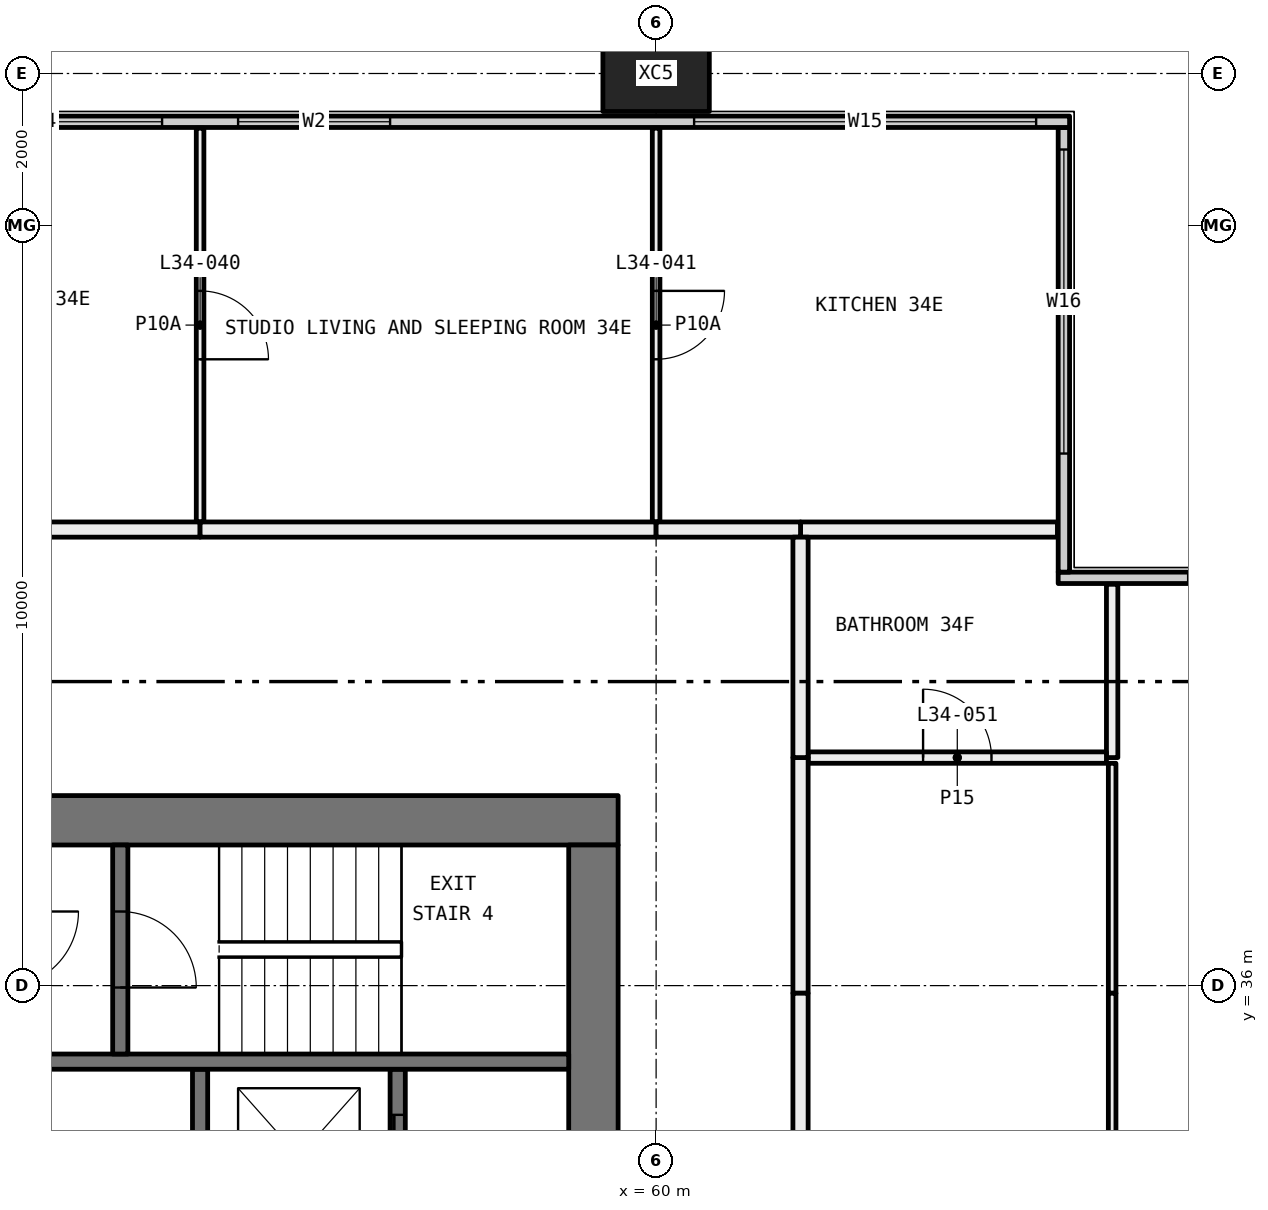
"""IFC4 building model, lengths in metres.
Left out: names, types, materials, properties, quantities, classifications, styles, units other than length and angle.
Written with IfcOpenShell. Run it as: python <this file> out.ifc"""

import sys

from ifc_helpers import new_model, si_unit, direction, frame, frame_2d, origin, origin_2d, place, context, subcontext, project, spatial, rectangle, hollow_rectangle, extrude, element, fill, save


model = new_model("IFC4")
c1 = context("Model", 3, precision=1e-05, world=origin(), true_north=direction((0.0, 1.0)))
c2 = subcontext(c1, "Body", "Model", "MODEL_VIEW")
j1 = project(units=[si_unit("LENGTHUNIT", "METRE"), si_unit("PLANEANGLEUNIT", "RADIAN")], contexts=[c1])
p1 = place(None, origin())
s1 = spatial("IfcSite", under=j1, at=p1, CompositionType="ELEMENT")
p2 = place(p1, origin())
s2 = spatial("IfcBuilding", under=s1, at=p2, CompositionType="ELEMENT")
p3 = place(p2, frame((0.0, 0.0, 131.1)))
s3 = spatial("IfcBuildingStorey", under=s2, at=p3, CompositionType="ELEMENT", Elevation=131.1)
p4 = place(p3, frame((60.0, 48.0, -0.4), z_axis=(0.0, 0.0, 1.0), x_axis=(1.0, 0.0, 0.0)))
e1 = element("IfcColumn", 1, at=p4, inside=s3, PredefinedType="COLUMN", context=c2, shape_type="SweptSolid", body=[
    extrude(hollow_rectangle(XDim=1.4, YDim=1.0, WallThickness=0.055, at=origin_2d()), origin(), (0.0, 0.0, 1.0), 3.45),
])
p5 = place(p3, frame((65.29, 41.365, 0.0), z_axis=(0.0, 0.0, 1.0), x_axis=(1.0, 0.0, 0.0)))
e2 = element("IfcWall", 2, at=p5, inside=s3, PredefinedType="ELEMENTEDWALL", context=c2, shape_type="SweptSolid", body=[
    extrude(rectangle(XDim=6.15, YDim=0.15, at=frame_2d((3.075, 0.0))), origin(), (0.0, 0.0, 1.0), 3.05),
])
p6 = place(p5, frame((1.71, 0.0, 0.45)))
e3 = element("IfcOpeningElement", 3, at=p6, cuts=e2, PredefinedType="OPENING", context=c2, shape_type="SweptSolid", body=[
    extrude(rectangle(XDim=4.0, YDim=2.55, at=frame_2d((2.0, 1.275))), frame((0.0, 0.085, 0.0), z_axis=(0.0, -1.0, 0.0), x_axis=(1.0, 0.0, 0.0)), (0.0, 0.0, 1.0), 0.17),
])
p7 = place(p3, frame((65.365, 41.44, 0.0), z_axis=(0.0, 0.0, 1.0), x_axis=(0.0, 1.0, 0.0)))
e4 = element("IfcWall", 4, at=p7, inside=s3, PredefinedType="ELEMENTEDWALL", context=c2, shape_type="SweptSolid", body=[
    extrude(rectangle(XDim=5.85, YDim=0.15, at=frame_2d((2.925, 0.0))), origin(), (0.0, 0.0, 1.0), 3.05),
])
p8 = place(p7, frame((1.56, 0.0, 0.45)))
e5 = element("IfcOpeningElement", 5, at=p8, cuts=e4, PredefinedType="OPENING", context=c2, shape_type="SweptSolid", body=[
    extrude(rectangle(XDim=4.0, YDim=2.55, at=frame_2d((2.0, 1.275))), frame((0.0, 0.085, 0.0), z_axis=(0.0, -1.0, 0.0), x_axis=(1.0, 0.0, 0.0)), (0.0, 0.0, 1.0), 0.17),
])
p9 = place(p3, frame((6.56, 47.365, 0.0), z_axis=(0.0, 0.0, 1.0), x_axis=(1.0, 0.0, 0.0)))
e6 = element("IfcWall", 6, at=p9, inside=s3, PredefinedType="ELEMENTEDWALL", context=c2, shape_type="SweptSolid", body=[
    extrude(rectangle(XDim=58.88, YDim=0.15, at=frame_2d((29.44, 0.0))), origin(), (0.0, 0.0, 1.0), 3.05),
])
p10 = place(p9, frame((0.44, 0.0, 0.45)))
e7 = element("IfcOpeningElement", 7, at=p10, cuts=e6, PredefinedType="OPENING", context=c2, shape_type="SweptSolid", body=[
    extrude(rectangle(XDim=4.5, YDim=2.55, at=frame_2d((2.25, 1.275))), frame((0.0, 0.085, 0.0), z_axis=(0.0, -1.0, 0.0), x_axis=(1.0, 0.0, 0.0)), (0.0, 0.0, 1.0), 0.17),
])
p11 = place(p9, frame((7.69, 0.0, 0.45)))
e8 = element("IfcOpeningElement", 8, at=p11, cuts=e6, PredefinedType="OPENING", context=c2, shape_type="SweptSolid", body=[
    extrude(rectangle(XDim=3.25, YDim=2.55, at=frame_2d((1.625, 1.275))), frame((0.0, 0.085, 0.0), z_axis=(0.0, -1.0, 0.0), x_axis=(1.0, 0.0, 0.0)), (0.0, 0.0, 1.0), 0.17),
])
p12 = place(p9, frame((11.94, 0.0, 0.45)))
e9 = element("IfcOpeningElement", 9, at=p12, cuts=e6, PredefinedType="OPENING", context=c2, shape_type="SweptSolid", body=[
    extrude(rectangle(XDim=3.25, YDim=2.55, at=frame_2d((1.625, 1.275))), frame((0.0, 0.085, 0.0), z_axis=(0.0, -1.0, 0.0), x_axis=(1.0, 0.0, 0.0)), (0.0, 0.0, 1.0), 0.17),
])
p13 = place(p9, frame((19.69, 0.0, 0.45)))
e10 = element("IfcOpeningElement", 10, at=p13, cuts=e6, PredefinedType="OPENING", context=c2, shape_type="SweptSolid", body=[
    extrude(rectangle(XDim=3.25, YDim=2.55, at=frame_2d((1.625, 1.275))), frame((0.0, 0.085, 0.0), z_axis=(0.0, -1.0, 0.0), x_axis=(1.0, 0.0, 0.0)), (0.0, 0.0, 1.0), 0.17),
])
p14 = place(p9, frame((23.94, 0.0, 0.45)))
e11 = element("IfcOpeningElement", 11, at=p14, cuts=e6, PredefinedType="OPENING", context=c2, shape_type="SweptSolid", body=[
    extrude(rectangle(XDim=2.0, YDim=2.55, at=frame_2d((1.0, 1.275))), frame((0.0, 0.085, 0.0), z_axis=(0.0, -1.0, 0.0), x_axis=(1.0, 0.0, 0.0)), (0.0, 0.0, 1.0), 0.17),
])
p15 = place(p9, frame((31.69, 0.0, 0.45)))
e12 = element("IfcOpeningElement", 12, at=p15, cuts=e6, PredefinedType="OPENING", context=c2, shape_type="SweptSolid", body=[
    extrude(rectangle(XDim=3.25, YDim=2.55, at=frame_2d((1.625, 1.275))), frame((0.0, 0.085, 0.0), z_axis=(0.0, -1.0, 0.0), x_axis=(1.0, 0.0, 0.0)), (0.0, 0.0, 1.0), 0.17),
])
p16 = place(p9, frame((35.94, 0.0, 0.45)))
e13 = element("IfcOpeningElement", 13, at=p16, cuts=e6, PredefinedType="OPENING", context=c2, shape_type="SweptSolid", body=[
    extrude(rectangle(XDim=3.25, YDim=2.55, at=frame_2d((1.625, 1.275))), frame((0.0, 0.085, 0.0), z_axis=(0.0, -1.0, 0.0), x_axis=(1.0, 0.0, 0.0)), (0.0, 0.0, 1.0), 0.17),
])
p17 = place(p9, frame((43.69, 0.0, 0.45)))
e14 = element("IfcOpeningElement", 14, at=p17, cuts=e6, PredefinedType="OPENING", context=c2, shape_type="SweptSolid", body=[
    extrude(rectangle(XDim=3.25, YDim=2.55, at=frame_2d((1.625, 1.275))), frame((0.0, 0.085, 0.0), z_axis=(0.0, -1.0, 0.0), x_axis=(1.0, 0.0, 0.0)), (0.0, 0.0, 1.0), 0.17),
])
p18 = place(p9, frame((47.94, 0.0, 0.45)))
e15 = element("IfcOpeningElement", 15, at=p18, cuts=e6, PredefinedType="OPENING", context=c2, shape_type="SweptSolid", body=[
    extrude(rectangle(XDim=2.0, YDim=2.55, at=frame_2d((1.0, 1.275))), frame((0.0, 0.085, 0.0), z_axis=(0.0, -1.0, 0.0), x_axis=(1.0, 0.0, 0.0)), (0.0, 0.0, 1.0), 0.17),
])
p19 = place(p9, frame((53.94, 0.0, 0.45)))
e16 = element("IfcOpeningElement", 16, at=p19, cuts=e6, PredefinedType="OPENING", context=c2, shape_type="SweptSolid", body=[
    extrude(rectangle(XDim=4.5, YDim=2.55, at=frame_2d((2.25, 1.275))), frame((0.0, 0.085, 0.0), z_axis=(0.0, -1.0, 0.0), x_axis=(1.0, 0.0, 0.0)), (0.0, 0.0, 1.0), 0.17),
])
p20 = place(p3, frame((54.0, 42.1, 0.0), z_axis=(0.0, 0.0, 1.0), x_axis=(0.0, 1.0, 0.0)))
e17 = element("IfcWall", 17, at=p20, inside=s3, PredefinedType="PARTITIONING", context=c2, shape_type="SweptSolid", body=[
    extrude(rectangle(XDim=5.18, YDim=0.1, at=frame_2d((2.59, 0.0))), origin(), (0.0, 0.0, 1.0), 3.05),
])
p21 = place(p20, frame((2.14, 0.0, 0.0)))
e18 = element("IfcOpeningElement", 18, at=p21, cuts=e17, PredefinedType="OPENING", context=c2, shape_type="SweptSolid", body=[
    extrude(rectangle(XDim=0.9, YDim=2.1, at=frame_2d((0.45, 1.05))), frame((0.0, 0.06, 0.0), z_axis=(0.0, -1.0, 0.0), x_axis=(1.0, 0.0, 0.0)), (0.0, 0.0, 1.0), 0.12),
])
p22 = place(p3, frame((48.0, 42.0, 0.0), z_axis=(0.0, 0.0, 1.0), x_axis=(1.0, 0.0, 0.0)))
e19 = element("IfcWall", 19, at=p22, inside=s3, PredefinedType="PARTITIONING", context=c2, shape_type="SweptSolid", body=[
    extrude(rectangle(XDim=6.0, YDim=0.2, at=frame_2d((3.0, 0.0))), origin(), (0.0, 0.0, 1.0), 3.05),
])
p23 = place(p22, frame((2.5, 0.0, 0.0)))
e20 = element("IfcOpeningElement", 20, at=p23, cuts=e19, PredefinedType="OPENING", context=c2, shape_type="SweptSolid", body=[
    extrude(rectangle(XDim=1.0, YDim=2.1, at=frame_2d((0.5, 1.05))), frame((0.0, 0.11, 0.0), z_axis=(0.0, -1.0, 0.0), x_axis=(1.0, 0.0, 0.0)), (0.0, 0.0, 1.0), 0.22),
])
p24 = place(p3, frame((60.0, 42.1, 0.0), z_axis=(0.0, 0.0, 1.0), x_axis=(0.0, 1.0, 0.0)))
e21 = element("IfcWall", 21, at=p24, inside=s3, PredefinedType="PARTITIONING", context=c2, shape_type="SweptSolid", body=[
    extrude(rectangle(XDim=5.18, YDim=0.1, at=frame_2d((2.59, 0.0))), origin(), (0.0, 0.0, 1.0), 3.05),
])
p25 = place(p24, frame((2.14, 0.0, 0.0)))
e22 = element("IfcOpeningElement", 22, at=p25, cuts=e21, PredefinedType="OPENING", context=c2, shape_type="SweptSolid", body=[
    extrude(rectangle(XDim=0.9, YDim=2.1, at=frame_2d((0.45, 1.05))), frame((0.0, 0.06, 0.0), z_axis=(0.0, -1.0, 0.0), x_axis=(1.0, 0.0, 0.0)), (0.0, 0.0, 1.0), 0.12),
])
p26 = place(p3, frame((54.0, 42.0, 0.0), z_axis=(0.0, 0.0, 1.0), x_axis=(1.0, 0.0, 0.0)))
e23 = element("IfcWall", 23, at=p26, inside=s3, PredefinedType="PARTITIONING", context=c2, shape_type="SweptSolid", body=[
    extrude(rectangle(XDim=6.0, YDim=0.2, at=frame_2d((3.0, 0.0))), origin(), (0.0, 0.0, 1.0), 3.05),
])
p27 = place(p3, frame((61.9, 42.0, 0.0), z_axis=(0.0, 0.0, 1.0), x_axis=(1.0, 0.0, 0.0)))
e24 = element("IfcWall", 24, at=p27, inside=s3, PredefinedType="PARTITIONING", context=c2, shape_type="SweptSolid", body=[
    extrude(rectangle(XDim=3.38, YDim=0.2, at=frame_2d((1.69, 0.0))), origin(), (0.0, 0.0, 1.0), 3.05),
])
p28 = place(p3, frame((60.0, 42.0, 0.0), z_axis=(0.0, 0.0, 1.0), x_axis=(1.0, 0.0, 0.0)))
e25 = element("IfcWall", 25, at=p28, inside=s3, PredefinedType="PARTITIONING", context=c2, shape_type="SweptSolid", body=[
    extrude(rectangle(XDim=1.9, YDim=0.2, at=frame_2d((0.95, 0.0))), origin(), (0.0, 0.0, 1.0), 3.05),
])
p29 = place(p3, frame((66.0, 38.925, 0.0), z_axis=(0.0, 0.0, 1.0), x_axis=(0.0, -1.0, 0.0)))
e26 = element("IfcWall", 26, at=p29, inside=s3, PredefinedType="PARTITIONING", context=c2, shape_type="SweptSolid", body=[
    extrude(rectangle(XDim=3.025, YDim=0.1, at=frame_2d((1.513, 0.0))), origin(), (0.0, 0.0, 1.0), 2.45),
])
p30 = place(p3, frame((66.0, 35.9, 0.0), z_axis=(0.0, 0.0, 1.0), x_axis=(0.0, -1.0, 0.0)))
e27 = element("IfcWall", 27, at=p30, inside=s3, PredefinedType="PARTITIONING", context=c2, shape_type="SweptSolid", body=[
    extrude(rectangle(XDim=5.85, YDim=0.1, at=frame_2d((2.925, 0.0))), origin(), (0.0, 0.0, 1.0), 3.05),
])
p31 = place(p3, frame((66.0, 41.28, 0.0), z_axis=(0.0, 0.0, 1.0), x_axis=(0.0, -1.0, 0.0)))
e28 = element("IfcWall", 28, at=p31, inside=s3, PredefinedType="PARTITIONING", context=c2, shape_type="SweptSolid", body=[
    extrude(rectangle(XDim=2.28, YDim=0.15, at=frame_2d((1.14, 0.0))), origin(), (0.0, 0.0, 1.0), 3.05),
])
p32 = place(p3, frame((65.925, 39.0, 0.0), z_axis=(0.0, 0.0, 1.0), x_axis=(-1.0, 0.0, 0.0)))
e29 = element("IfcWall", 29, at=p32, inside=s3, PredefinedType="PARTITIONING", context=c2, shape_type="SweptSolid", body=[
    extrude(rectangle(XDim=3.925, YDim=0.15, at=frame_2d((1.962, 0.0))), origin(), (0.0, 0.0, 1.0), 3.05),
])
p33 = place(p32, frame((1.512, 0.0, 0.0)))
e30 = element("IfcOpeningElement", 30, at=p33, cuts=e29, PredefinedType="OPENING", context=c2, shape_type="SweptSolid", body=[
    extrude(rectangle(XDim=0.9, YDim=2.1, at=frame_2d((0.45, 1.05))), frame((0.0, 0.085, 0.0), z_axis=(0.0, -1.0, 0.0), x_axis=(1.0, 0.0, 0.0)), (0.0, 0.0, 1.0), 0.17),
])
p34 = place(p3, frame((61.9, 39.0, 0.0), z_axis=(0.0, 0.0, 1.0), x_axis=(0.0, -1.0, 0.0)))
e31 = element("IfcWall", 31, at=p34, inside=s3, PredefinedType="PARTITIONING", context=c2, shape_type="SweptSolid", body=[
    extrude(rectangle(XDim=3.1, YDim=0.2, at=frame_2d((1.55, 0.0))), origin(), (0.0, 0.0, 1.0), 2.45),
])
p35 = place(p3, frame((61.9, 35.9, 0.0), z_axis=(0.0, 0.0, 1.0), x_axis=(0.0, -1.0, 0.0)))
e32 = element("IfcWall", 32, at=p35, inside=s3, PredefinedType="PARTITIONING", context=c2, shape_type="SweptSolid", body=[
    extrude(rectangle(XDim=10.4, YDim=0.2, at=frame_2d((5.2, 0.0))), origin(), (0.0, 0.0, 1.0), 3.05),
])
p36 = place(p3, frame((61.9, 41.9, 0.0), z_axis=(0.0, 0.0, 1.0), x_axis=(0.0, -1.0, 0.0)))
e33 = element("IfcWall", 33, at=p36, inside=s3, PredefinedType="PARTITIONING", context=c2, shape_type="SweptSolid", body=[
    extrude(rectangle(XDim=2.9, YDim=0.2, at=frame_2d((1.45, 0.0))), origin(), (0.0, 0.0, 1.0), 3.05),
])
p37 = place(p3, frame((59.5, 38.175, 0.0), z_axis=(0.0, 0.0, 1.0), x_axis=(-1.0, 0.0, 0.0)))
e34 = element("IfcWall", 34, at=p37, inside=s3, PredefinedType="SHEAR", context=c2, shape_type="SweptSolid", body=[
    extrude(rectangle(XDim=11.0, YDim=0.65, at=frame_2d((5.5, 0.0))), origin(), (0.0, 0.0, 1.0), 3.05),
])
p38 = place(p37, frame((8.475, 0.0, 0.0)))
e35 = element("IfcOpeningElement", 35, at=p38, cuts=e34, PredefinedType="OPENING", context=c2, shape_type="SweptSolid", body=[
    extrude(rectangle(XDim=1.6, YDim=2.1, at=frame_2d((0.8, 1.05))), frame((0.0, 0.335, 0.0), z_axis=(0.0, -1.0, 0.0), x_axis=(1.0, 0.0, 0.0)), (0.0, 0.0, 1.0), 0.67),
])
p39 = place(p3, frame((59.175, 22.15, 0.0), z_axis=(0.0, 0.0, 1.0), x_axis=(0.0, 1.0, 0.0)))
e36 = element("IfcWall", 36, at=p39, inside=s3, PredefinedType="SHEAR", context=c2, shape_type="SweptSolid", body=[
    extrude(rectangle(XDim=15.7, YDim=0.65, at=frame_2d((7.85, 0.0))), origin(), (0.0, 0.0, 1.0), 3.05),
])
p40 = place(p39, frame((8.3, 0.0, 0.0)))
e37 = element("IfcOpeningElement", 37, at=p40, cuts=e36, PredefinedType="OPENING", context=c2, shape_type="SweptSolid", body=[
    extrude(rectangle(XDim=1.6, YDim=2.1, at=frame_2d((0.8, 1.05))), frame((0.0, 0.335, 0.0), z_axis=(0.0, -1.0, 0.0), x_axis=(1.0, 0.0, 0.0)), (0.0, 0.0, 1.0), 0.67),
])
p41 = place(p39, frame((2.125, 0.0, 0.0)))
e38 = element("IfcOpeningElement", 38, at=p41, cuts=e36, PredefinedType="OPENING", context=c2, shape_type="SweptSolid", body=[
    extrude(rectangle(XDim=1.0, YDim=2.1, at=frame_2d((0.5, 1.05))), frame((0.0, 0.335, 0.0), z_axis=(0.0, -1.0, 0.0), x_axis=(1.0, 0.0, 0.0)), (0.0, 0.0, 1.0), 0.67),
])
p42 = place(p3, frame((56.6, 22.15, 0.0), z_axis=(0.0, 0.0, 1.0), x_axis=(0.0, 1.0, 0.0)))
e39 = element("IfcWall", 39, at=p42, inside=s3, PredefinedType="SOLIDWALL", context=c2, shape_type="SweptSolid", body=[
    extrude(rectangle(XDim=12.75, YDim=0.2, at=frame_2d((6.375, 0.0))), origin(), (0.0, 0.0, 1.0), 3.05),
])
p43 = place(p42, frame((3.55, 0.0, 0.0)))
e40 = element("IfcOpeningElement", 40, at=p43, cuts=e39, PredefinedType="OPENING", context=c2, shape_type="SweptSolid", body=[
    extrude(rectangle(XDim=1.1, YDim=2.1, at=frame_2d((0.55, 1.05))), frame((0.0, 0.11, 0.0), z_axis=(0.0, -1.0, 0.0), x_axis=(1.0, 0.0, 0.0)), (0.0, 0.0, 1.0), 0.22),
])
p44 = place(p42, frame((6.05, 0.0, 0.0)))
e41 = element("IfcOpeningElement", 41, at=p44, cuts=e39, PredefinedType="OPENING", context=c2, shape_type="SweptSolid", body=[
    extrude(rectangle(XDim=1.1, YDim=2.1, at=frame_2d((0.55, 1.05))), frame((0.0, 0.11, 0.0), z_axis=(0.0, -1.0, 0.0), x_axis=(1.0, 0.0, 0.0)), (0.0, 0.0, 1.0), 0.22),
])
p45 = place(p42, frame((8.55, 0.0, 0.0)))
e42 = element("IfcOpeningElement", 42, at=p45, cuts=e39, PredefinedType="OPENING", context=c2, shape_type="SweptSolid", body=[
    extrude(rectangle(XDim=1.1, YDim=2.1, at=frame_2d((0.55, 1.05))), frame((0.0, 0.11, 0.0), z_axis=(0.0, -1.0, 0.0), x_axis=(1.0, 0.0, 0.0)), (0.0, 0.0, 1.0), 0.22),
])
p46 = place(p42, frame((11.05, 0.0, 0.0)))
e43 = element("IfcOpeningElement", 43, at=p46, cuts=e39, PredefinedType="OPENING", context=c2, shape_type="SweptSolid", body=[
    extrude(rectangle(XDim=1.1, YDim=2.1, at=frame_2d((0.55, 1.05))), frame((0.0, 0.11, 0.0), z_axis=(0.0, -1.0, 0.0), x_axis=(1.0, 0.0, 0.0)), (0.0, 0.0, 1.0), 0.22),
])
p47 = place(p42, frame((0.15, 0.0, 0.0)))
e44 = element("IfcOpeningElement", 44, at=p47, cuts=e39, PredefinedType="OPENING", context=c2, shape_type="SweptSolid", body=[
    extrude(rectangle(XDim=1.0, YDim=2.1, at=frame_2d((0.5, 1.05))), frame((0.0, 0.11, 0.0), z_axis=(0.0, -1.0, 0.0), x_axis=(1.0, 0.0, 0.0)), (0.0, 0.0, 1.0), 0.22),
])
p48 = place(p3, frame((54.0, 25.1, 0.0), z_axis=(0.0, 0.0, 1.0), x_axis=(0.0, 1.0, 0.0)))
e45 = element("IfcWall", 45, at=p48, inside=s3, PredefinedType="SOLIDWALL", context=c2, shape_type="SweptSolid", body=[
    extrude(rectangle(XDim=9.8, YDim=0.2, at=frame_2d((4.9, 0.0))), origin(), (0.0, 0.0, 1.0), 3.05),
])
p49 = place(p3, frame((58.85, 35.0, 0.0), z_axis=(0.0, 0.0, 1.0), x_axis=(-1.0, 0.0, 0.0)))
e46 = element("IfcWall", 46, at=p49, inside=s3, PredefinedType="SOLIDWALL", context=c2, shape_type="SweptSolid", body=[
    extrude(rectangle(XDim=7.35, YDim=0.2, at=frame_2d((3.675, 0.0))), origin(), (0.0, 0.0, 1.0), 3.05),
])
p50 = place(p3, frame((52.95, 35.1, 0.0), z_axis=(0.0, 0.0, 1.0), x_axis=(0.0, 1.0, 0.0)))
e47 = element("IfcWall", 47, at=p50, inside=s3, PredefinedType="SOLIDWALL", context=c2, shape_type="SweptSolid", body=[
    extrude(rectangle(XDim=2.75, YDim=0.2, at=frame_2d((1.375, 0.0))), origin(), (0.0, 0.0, 1.0), 3.05),
])
p51 = place(p50, frame((0.875, 0.0, 0.0)))
e48 = element("IfcOpeningElement", 48, at=p51, cuts=e47, PredefinedType="OPENING", context=c2, shape_type="SweptSolid", body=[
    extrude(rectangle(XDim=1.0, YDim=2.1, at=frame_2d((0.5, 1.05))), frame((0.0, 0.11, 0.0), z_axis=(0.0, -1.0, 0.0), x_axis=(1.0, 0.0, 0.0)), (0.0, 0.0, 1.0), 0.22),
])
p52 = place(p8, origin())
e49 = element("IfcWindow", 49, at=p52, inside=s3, PartitioningType="SINGLE_PANEL", PredefinedType="WINDOW", context=c2, shape_type="SweptSolid", body=[
    extrude(rectangle(XDim=4.0, YDim=2.55, at=frame_2d((2.0, 1.275))), frame((0.0, 0.03, 0.0), z_axis=(0.0, -1.0, 0.0), x_axis=(1.0, 0.0, 0.0)), (0.0, 0.0, 1.0), 0.06),
])
fill(e5, e49)
p53 = place(p17, origin())
e50 = element("IfcWindow", 50, at=p53, inside=s3, PartitioningType="SINGLE_PANEL", PredefinedType="WINDOW", context=c2, shape_type="SweptSolid", body=[
    extrude(rectangle(XDim=3.25, YDim=2.55, at=frame_2d((1.625, 1.275))), frame((0.0, 0.03, 0.0), z_axis=(0.0, -1.0, 0.0), x_axis=(1.0, 0.0, 0.0)), (0.0, 0.0, 1.0), 0.06),
])
fill(e14, e50)
p54 = place(p18, origin())
e51 = element("IfcWindow", 51, at=p54, inside=s3, PartitioningType="SINGLE_PANEL", PredefinedType="WINDOW", context=c2, shape_type="SweptSolid", body=[
    extrude(rectangle(XDim=2.0, YDim=2.55, at=frame_2d((1.0, 1.275))), frame((0.0, 0.03, 0.0), z_axis=(0.0, -1.0, 0.0), x_axis=(1.0, 0.0, 0.0)), (0.0, 0.0, 1.0), 0.06),
])
fill(e15, e51)
p55 = place(p19, origin())
e52 = element("IfcWindow", 52, at=p55, inside=s3, PartitioningType="SINGLE_PANEL", PredefinedType="WINDOW", context=c2, shape_type="SweptSolid", body=[
    extrude(rectangle(XDim=4.5, YDim=2.55, at=frame_2d((2.25, 1.275))), frame((0.0, 0.03, 0.0), z_axis=(0.0, -1.0, 0.0), x_axis=(1.0, 0.0, 0.0)), (0.0, 0.0, 1.0), 0.06),
])
fill(e16, e52)
p56 = place(p21, frame((0.9, 0.0, 0.0), x_axis=(-1.0, 0.0, 0.0)))
e53 = element("IfcDoor", 53, at=p56, inside=s3, OperationType="SINGLE_SWING_LEFT", PredefinedType="DOOR", context=c2, shape_type="SweptSolid", body=[
    extrude(rectangle(XDim=0.9, YDim=2.1, at=frame_2d((0.45, 1.05))), frame((0.0, 0.025, 0.0), z_axis=(0.0, -1.0, 0.0), x_axis=(1.0, 0.0, 0.0)), (0.0, 0.0, 1.0), 0.05),
])
fill(e18, e53)
p57 = place(p25, frame((0.9, 0.0, 0.0), x_axis=(-1.0, 0.0, 0.0)))
e54 = element("IfcDoor", 54, at=p57, inside=s3, OperationType="SINGLE_SWING_RIGHT", PredefinedType="DOOR", context=c2, shape_type="SweptSolid", body=[
    extrude(rectangle(XDim=0.9, YDim=2.1, at=frame_2d((0.45, 1.05))), frame((0.0, 0.025, 0.0), z_axis=(0.0, -1.0, 0.0), x_axis=(1.0, 0.0, 0.0)), (0.0, 0.0, 1.0), 0.05),
])
fill(e22, e54)
p58 = place(p33, frame((0.9, 0.0, 0.0), x_axis=(-1.0, 0.0, 0.0)))
e55 = element("IfcDoor", 55, at=p58, inside=s3, OperationType="SINGLE_SWING_RIGHT", PredefinedType="DOOR", context=c2, shape_type="SweptSolid", body=[
    extrude(rectangle(XDim=0.9, YDim=2.1, at=frame_2d((0.45, 1.05))), frame((0.0, 0.025, 0.0), z_axis=(0.0, -1.0, 0.0), x_axis=(1.0, 0.0, 0.0)), (0.0, 0.0, 1.0), 0.05),
])
fill(e30, e55)
p59 = place(p46, origin())
e56 = element("IfcDoor", 56, at=p59, inside=s3, OperationType="SLIDING_TO_LEFT", PredefinedType="DOOR", context=c2, shape_type="SweptSolid", body=[
    extrude(rectangle(XDim=1.1, YDim=2.1, at=frame_2d((0.55, 1.05))), frame((0.0, 0.025, 0.0), z_axis=(0.0, -1.0, 0.0), x_axis=(1.0, 0.0, 0.0)), (0.0, 0.0, 1.0), 0.05),
])
fill(e43, e56)
p60 = place(p51, frame((1.0, 0.0, 0.0), x_axis=(-1.0, 0.0, 0.0)))
e57 = element("IfcDoor", 57, at=p60, inside=s3, OperationType="SINGLE_SWING_LEFT", PredefinedType="DOOR", context=c2, shape_type="SweptSolid", body=[
    extrude(rectangle(XDim=1.0, YDim=2.1, at=frame_2d((0.5, 1.05))), frame((0.0, 0.025, 0.0), z_axis=(0.0, -1.0, 0.0), x_axis=(1.0, 0.0, 0.0)), (0.0, 0.0, 1.0), 0.05),
])
fill(e48, e57)
save(model, sys.argv[1])
